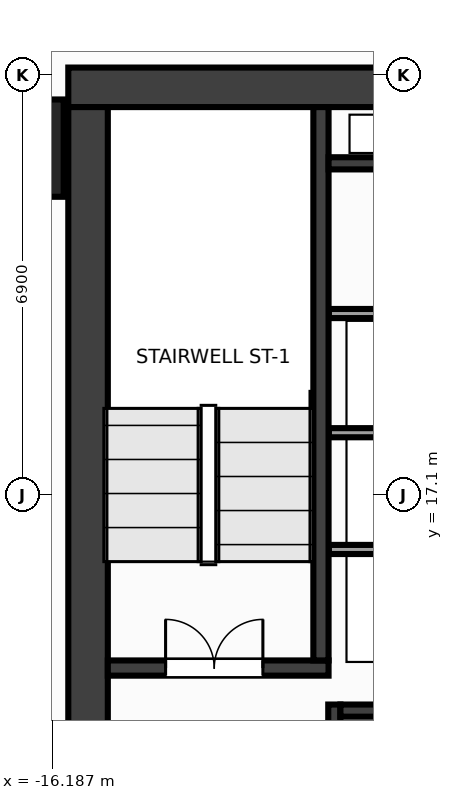
"""IFC4 building model, lengths in metres.
Left out: names, types, materials, properties, quantities, classifications, styles, units other than length and angle.
Written with IfcOpenShell. Run it as: python <this file> out.ifc"""

import sys

from ifc_helpers import new_model, si_unit, direction, frame, frame_2d, origin, origin_2d, place, context, subcontext, project, spatial, rectangle, extrude, source, transform, mapped, element, fill, save


model = new_model("IFC4")
c1 = context("Model", 3, precision=1e-05, world=origin(), true_north=direction((0.0, 1.0)))
c2 = subcontext(c1, "Body", "Model", "MODEL_VIEW")
j1 = project(units=[si_unit("LENGTHUNIT", "METRE"), si_unit("PLANEANGLEUNIT", "RADIAN")], contexts=[c1])
p1 = place(None, origin())
s1 = spatial("IfcSite", under=j1, at=p1, CompositionType="ELEMENT")
p2 = place(p1, origin())
s2 = spatial("IfcBuilding", under=s1, at=p2, CompositionType="ELEMENT")
p3 = place(p2, frame((0.0, 0.0, 153.2)))
s3 = spatial("IfcBuildingStorey", under=s2, at=p3, CompositionType="ELEMENT", Elevation=153.2)
m1 = source(origin(), c2, "Body", "SweptSolid", [
    extrude(rectangle(XDim=31.85, YDim=0.65, at=frame_2d((15.925, 0.0))), origin(), (0.0, 0.0, 1.0), 3.6),
])
p4 = place(p3, frame((-15.925, 23.8, 0.0), z_axis=(0.0, 0.0, 1.0), x_axis=(1.0, 0.0, 0.0)))
e1 = element("IfcWall", 1, at=p4, inside=s3, PredefinedType="SHEAR", context=c2, shape_type="MappedRepresentation", body=[
    mapped(m1, transform((0.0, 0.0, 0.0), x_axis=(1.0, 0.0, 0.0), y_axis=(0.0, 1.0, 0.0), z_axis=(0.0, 0.0, 1.0), scale=1.0)),
])
m2 = source(origin(), c2, "Body", "SweptSolid", [
    extrude(rectangle(XDim=12.95, YDim=0.65, at=frame_2d((6.475, 0.0))), origin(), (0.0, 0.0, 1.0), 3.6),
])
p5 = place(p3, frame((-15.6, 10.525, 0.0), z_axis=(0.0, 0.0, 1.0), x_axis=(0.0, 1.0, 0.0)))
e2 = element("IfcWall", 2, at=p5, inside=s3, PredefinedType="SHEAR", context=c2, shape_type="MappedRepresentation", body=[
    mapped(m2, transform((0.0, 0.0, 0.0), x_axis=(1.0, 0.0, 0.0), y_axis=(0.0, 1.0, 0.0), z_axis=(0.0, 0.0, 1.0), scale=1.0)),
])
m3 = source(origin(), c2, "Body", "SweptSolid", [
    extrude(rectangle(XDim=3.63, YDim=0.25, at=frame_2d((1.815, 0.0))), origin(), (0.0, 0.0, 1.0), 3.6),
])
p6 = place(p3, frame((-15.275, 14.25, 0.0), z_axis=(0.0, 0.0, 1.0), x_axis=(1.0, 0.0, 0.0)))
e3 = element("IfcWall", 3, at=p6, inside=s3, PredefinedType="SHEAR", context=c2, shape_type="MappedRepresentation", body=[
    mapped(m3, transform((0.0, 0.0, 0.0), x_axis=(1.0, 0.0, 0.0), y_axis=(0.0, 1.0, 0.0), z_axis=(0.0, 0.0, 1.0), scale=1.0)),
])
p7 = place(p6, frame((0.95, 0.0, 0.0)))
e4 = element("IfcOpeningElement", 4, at=p7, cuts=e3, PredefinedType="OPENING", context=c2, shape_type="SweptSolid", body=[
    extrude(rectangle(XDim=1.6, YDim=2.15, at=frame_2d((0.8, 1.075))), frame((0.0, 0.137, 0.0), z_axis=(0.0, -1.0, 0.0), x_axis=(1.0, 0.0, 0.0)), (0.0, 0.0, 1.0), 0.274),
])
m4 = source(origin(), c2, "Body", "SweptSolid", [
    extrude(rectangle(XDim=9.1, YDim=0.25, at=frame_2d((4.55, 0.0))), origin(), (0.0, 0.0, 1.0), 3.6),
])
p8 = place(p3, frame((-11.77, 14.375, 0.0), z_axis=(0.0, 0.0, 1.0), x_axis=(0.0, 1.0, 0.0)))
e5 = element("IfcWall", 5, at=p8, inside=s3, PredefinedType="SHEAR", context=c2, shape_type="MappedRepresentation", body=[
    mapped(m4, transform((0.0, 0.0, 0.0), x_axis=(1.0, 0.0, 0.0), y_axis=(0.0, 1.0, 0.0), z_axis=(0.0, 0.0, 1.0), scale=1.0)),
])
m5 = source(origin(), c2, "Body", "SweptSolid", [
    extrude(rectangle(XDim=3.125, YDim=0.2, at=frame_2d((1.562, 0.0))), origin(), (0.0, 0.0, 1.0), 3.6),
])
p9 = place(p3, frame((-11.55, 10.525, 0.0), z_axis=(0.0, 0.0, 1.0), x_axis=(0.0, 1.0, 0.0)))
e6 = element("IfcWall", 6, at=p9, inside=s3, PredefinedType="SHEAR", context=c2, shape_type="MappedRepresentation", body=[
    mapped(m5, transform((0.0, 0.0, 0.0), x_axis=(1.0, 0.0, 0.0), y_axis=(0.0, 1.0, 0.0), z_axis=(0.0, 0.0, 1.0), scale=1.0)),
])
p10 = place(p9, frame((0.9, 0.0, 0.0)))
e7 = element("IfcOpeningElement", 7, at=p10, cuts=e6, PredefinedType="OPENING", context=c2, shape_type="SweptSolid", body=[
    extrude(rectangle(XDim=1.1, YDim=2.15, at=frame_2d((0.55, 1.075))), frame((0.0, 0.112, 0.0), z_axis=(0.0, -1.0, 0.0), x_axis=(1.0, 0.0, 0.0)), (0.0, 0.0, 1.0), 0.224),
])
m6 = source(origin(), c2, "Body", "SweptSolid", [
    extrude(rectangle(XDim=2.825, YDim=0.2, at=frame_2d((1.413, 0.0))), origin(), (0.0, 0.0, 1.0), 3.6),
])
p11 = place(p3, frame((-11.45, 13.55, 0.0), z_axis=(0.0, 0.0, 1.0), x_axis=(1.0, 0.0, 0.0)))
e8 = element("IfcWall", 8, at=p11, inside=s3, PredefinedType="SHEAR", context=c2, shape_type="MappedRepresentation", body=[
    mapped(m6, transform((0.0, 0.0, 0.0), x_axis=(1.0, 0.0, 0.0), y_axis=(0.0, 1.0, 0.0), z_axis=(0.0, 0.0, 1.0), scale=1.0)),
])
m7 = source(origin(), c2, "Body", "SweptSolid", [
    extrude(rectangle(XDim=3.02, YDim=0.2, at=frame_2d((1.51, 0.0))), origin(), (0.0, 0.0, 1.0), 3.6),
])
p12 = place(p3, frame((-11.645, 22.55, 0.0), z_axis=(0.0, 0.0, 1.0), x_axis=(1.0, 0.0, 0.0)))
e9 = element("IfcWall", 9, at=p12, inside=s3, PredefinedType="SHEAR", context=c2, shape_type="MappedRepresentation", body=[
    mapped(m7, transform((0.0, 0.0, 0.0), x_axis=(1.0, 0.0, 0.0), y_axis=(0.0, 1.0, 0.0), z_axis=(0.0, 0.0, 1.0), scale=1.0)),
])
m8 = source(origin(), c2, "Body", "SweptSolid", [
    extrude(rectangle(XDim=1.6, YDim=1.6, at=origin_2d()), origin(), (0.0, 0.0, 1.0), 3.6),
])
p13 = place(p3, frame((-16.8, 22.8, 0.0), z_axis=(0.0, 0.0, 1.0), x_axis=(1.0, 0.0, 0.0)))
e10 = element("IfcColumn", 10, at=p13, inside=s3, PredefinedType="COLUMN", context=c2, shape_type="MappedRepresentation", body=[
    mapped(m8, transform((0.0, 0.0, 0.0), x_axis=(1.0, 0.0, 0.0), y_axis=(0.0, 1.0, 0.0), z_axis=(0.0, 0.0, 1.0), scale=1.0)),
])
m9 = source(origin(), c2, "Body", "SweptSolid", [
    extrude(rectangle(XDim=3.01, YDim=0.15, at=frame_2d((1.505, 0.0))), origin(), (0.0, 0.0, 1.0), 3.38),
])
for number, where, z_axis, x_axis in (
    (11, (-11.64, 16.2, 0.0), (0.0, 0.0, 1.0), (1.0, 0.0, 0.0)),
    (12, (-11.64, 18.12, 0.0), (0.0, 0.0, 1.0), (1.0, 0.0, 0.0)),
    (13, (-11.64, 20.08, 0.0), (0.0, 0.0, 1.0), (1.0, 0.0, 0.0)),
):
    element("IfcWall", number, at=place(p3, frame(where, z_axis=z_axis, x_axis=x_axis)), inside=s3, PredefinedType="PARTITIONING", context=c2, shape_type="MappedRepresentation", body=[
        mapped(m9, transform((0.0, 0.0, 0.0), x_axis=(1.0, 0.0, 0.0), y_axis=(0.0, 1.0, 0.0), z_axis=(0.0, 0.0, 1.0), scale=1.0)),
    ])
m10 = source(origin(), c2, "Body", "SweptSolid", [
    extrude(rectangle(XDim=1.6, YDim=2.15, at=frame_2d((0.8, 1.075))), frame((0.0, 0.025, 0.0), z_axis=(0.0, -1.0, 0.0), x_axis=(1.0, 0.0, 0.0)), (0.0, 0.0, 1.0), 0.05),
])
p14 = place(p7, origin())
e14 = element("IfcDoor", 14, at=p14, inside=s3, OperationType="DOUBLE_DOOR_SINGLE_SWING", PredefinedType="DOOR", context=c2, shape_type="MappedRepresentation", body=[
    mapped(m10, transform((0.0, 0.0, 0.0), x_axis=(1.0, 0.0, 0.0), y_axis=(0.0, 1.0, 0.0), z_axis=(0.0, 0.0, 1.0), scale=1.0)),
])
fill(e4, e14)
save(model, sys.argv[1])
